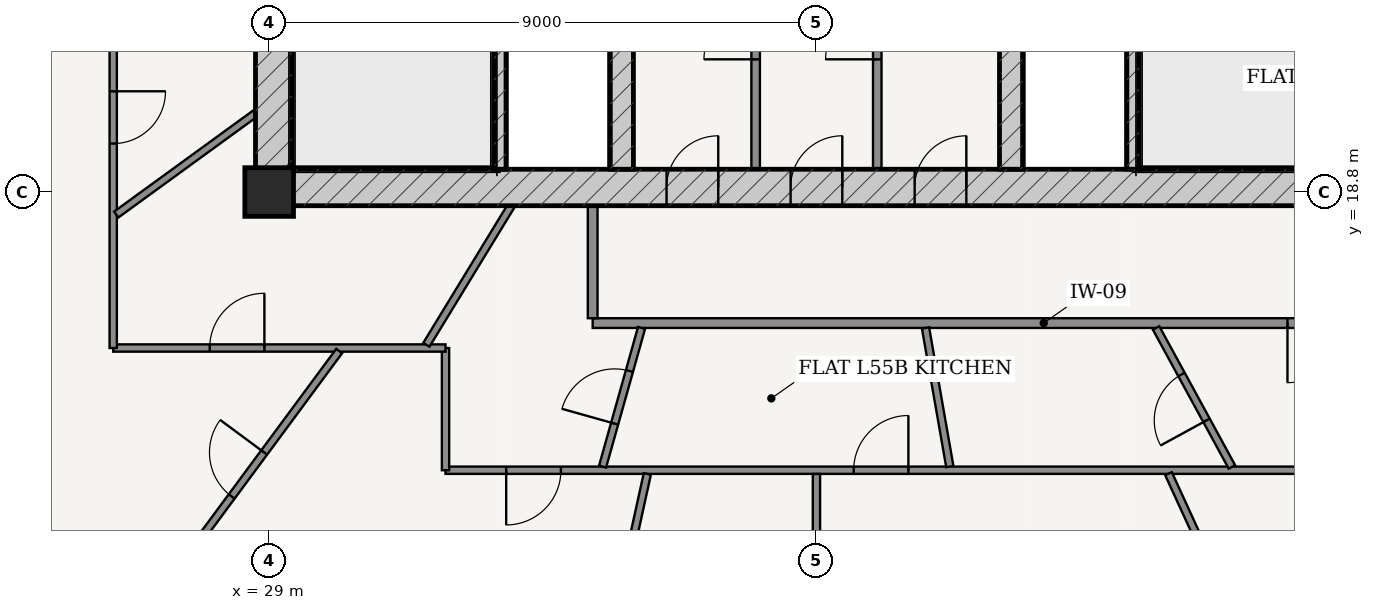
"""IFC4 building model, lengths in metres.
Left out: names, types, materials, properties, quantities, classifications, styles, units other than length and angle.
Written with IfcOpenShell. Run it as: python <this file> out.ifc"""

import sys

from ifc_helpers import new_model, si_unit, direction, frame, frame_2d, origin, origin_2d, place, context, subcontext, project, spatial, rectangle, extrude, source, transform, mapped, element, fill, save


model = new_model("IFC4")
c1 = context("Model", 3, precision=1e-05, world=origin(), true_north=direction((-0.2419218956, 0.970295726276)))
c2 = subcontext(c1, "Body", "Model", "MODEL_VIEW")
j1 = project(units=[si_unit("LENGTHUNIT", "METRE"), si_unit("PLANEANGLEUNIT", "RADIAN")], contexts=[c1])
p1 = place(None, origin())
s1 = spatial("IfcSite", under=j1, at=p1, CompositionType="ELEMENT")
p2 = place(p1, origin())
s2 = spatial("IfcBuilding", under=s1, at=p2, CompositionType="ELEMENT")
p3 = place(p2, frame((0.0, 0.0, 209.7)))
s3 = spatial("IfcBuildingStorey", under=s2, at=p3, CompositionType="ELEMENT", Elevation=209.7)
p4 = place(p3, frame((29.0, 18.8, 0.0), z_axis=(0.0, 0.0, 1.0), x_axis=(1.0, 0.0, 0.0)))
e1 = element("IfcColumn", 1, at=p4, inside=s3, PredefinedType="COLUMN", context=c2, shape_type="SweptSolid", body=[
    extrude(rectangle(XDim=0.8, YDim=0.8, at=origin_2d()), origin(), (0.0, 0.0, 1.0), 3.7),
])
p5 = place(p3, frame((28.775, 18.875, 0.0), z_axis=(0.0, 0.0, 1.0), x_axis=(1.0, 0.0, 0.0)))
e2 = element("IfcWall", 2, at=p5, inside=s3, PredefinedType="SHEAR", context=c2, shape_type="SweptSolid", body=[
    extrude(rectangle(XDim=18.45, YDim=0.6, at=frame_2d((9.225, 0.0))), origin(), (0.0, 0.0, 1.0), 3.435),
])
p6 = place(p5, frame((6.76, 0.0, 0.0)))
e3 = element("IfcOpeningElement", 3, at=p6, cuts=e2, PredefinedType="OPENING", context=c2, shape_type="SweptSolid", body=[
    extrude(rectangle(XDim=0.85, YDim=2.1, at=frame_2d((0.425, 1.05))), frame((0.0, 0.31, 0.0), z_axis=(0.0, -1.0, 0.0), x_axis=(1.0, 0.0, 0.0)), (0.0, 0.0, 1.0), 0.62),
])
p7 = place(p5, frame((8.8, 0.0, 0.0)))
e4 = element("IfcOpeningElement", 4, at=p7, cuts=e2, PredefinedType="OPENING", context=c2, shape_type="SweptSolid", body=[
    extrude(rectangle(XDim=0.85, YDim=2.1, at=frame_2d((0.425, 1.05))), frame((0.0, 0.31, 0.0), z_axis=(0.0, -1.0, 0.0), x_axis=(1.0, 0.0, 0.0)), (0.0, 0.0, 1.0), 0.62),
])
p8 = place(p5, frame((10.84, 0.0, 0.0)))
e5 = element("IfcOpeningElement", 5, at=p8, cuts=e2, PredefinedType="OPENING", context=c2, shape_type="SweptSolid", body=[
    extrude(rectangle(XDim=0.85, YDim=2.1, at=frame_2d((0.425, 1.05))), frame((0.0, 0.31, 0.0), z_axis=(0.0, -1.0, 0.0), x_axis=(1.0, 0.0, 0.0)), (0.0, 0.0, 1.0), 0.62),
])
p9 = place(p3, frame((29.075, 19.175, 0.0), z_axis=(0.0, 0.0, 1.0), x_axis=(0.0, 1.0, 0.0)))
e6 = element("IfcWall", 6, at=p9, inside=s3, PredefinedType="SHEAR", context=c2, shape_type="SweptSolid", body=[
    extrude(rectangle(XDim=15.25, YDim=0.6, at=frame_2d((7.625, 0.0))), origin(), (0.0, 0.0, 1.0), 3.435),
])
p10 = place(p9, frame((9.875, 0.0, 0.0)))
e7 = element("IfcOpeningElement", 7, at=p10, cuts=e6, PredefinedType="OPENING", context=c2, shape_type="SweptSolid", body=[
    extrude(rectangle(XDim=1.5, YDim=2.2, at=frame_2d((0.75, 1.1))), frame((0.0, 0.31, 0.0), z_axis=(0.0, -1.0, 0.0), x_axis=(1.0, 0.0, 0.0)), (0.0, 0.0, 1.0), 0.62),
])
for number, where, z_axis, x_axis in (
    (8, (32.795, 19.175, 0.0), (0.0, 0.0, 1.0), (0.0, 1.0, 0.0)),
    (9, (43.205, 19.175, 0.0), (0.0, 0.0, 1.0), (0.0, 1.0, 0.0)),
):
    element("IfcWall", number, at=place(p3, frame(where, z_axis=z_axis, x_axis=x_axis)), inside=s3, PredefinedType="SOLIDWALL", context=c2, shape_type="SweptSolid", body=[
        extrude(rectangle(XDim=7.375, YDim=0.2, at=frame_2d((3.688, 0.0))), origin(), (0.0, 0.0, 1.0), 3.435),
    ])
p11 = place(p3, frame((34.8, 19.175, 0.0), z_axis=(0.0, 0.0, 1.0), x_axis=(0.0, 1.0, 0.0)))
e10 = element("IfcWall", 10, at=p11, inside=s3, PredefinedType="SHEAR", context=c2, shape_type="SweptSolid", body=[
    extrude(rectangle(XDim=15.25, YDim=0.38, at=frame_2d((7.625, 0.0))), origin(), (0.0, 0.0, 1.0), 3.435),
])
p12 = place(p11, frame((7.8, 0.0, 0.0)))
e11 = element("IfcOpeningElement", 11, at=p12, cuts=e10, PredefinedType="OPENING", context=c2, shape_type="SweptSolid", body=[
    extrude(rectangle(XDim=1.05, YDim=2.15, at=frame_2d((0.525, 1.075))), frame((0.0, 0.2, 0.0), z_axis=(0.0, -1.0, 0.0), x_axis=(1.0, 0.0, 0.0)), (0.0, 0.0, 1.0), 0.4),
])
p13 = place(p3, frame((41.2, 19.175, 0.0), z_axis=(0.0, 0.0, 1.0), x_axis=(0.0, 1.0, 0.0)))
e12 = element("IfcWall", 12, at=p13, inside=s3, PredefinedType="SHEAR", context=c2, shape_type="SweptSolid", body=[
    extrude(rectangle(XDim=15.25, YDim=0.38, at=frame_2d((7.625, 0.0))), origin(), (0.0, 0.0, 1.0), 3.435),
])
p14 = place(p13, frame((7.8, 0.0, 0.0)))
e13 = element("IfcOpeningElement", 13, at=p14, cuts=e12, PredefinedType="OPENING", context=c2, shape_type="SweptSolid", body=[
    extrude(rectangle(XDim=1.05, YDim=2.15, at=frame_2d((0.525, 1.075))), frame((0.0, 0.2, 0.0), z_axis=(0.0, -1.0, 0.0), x_axis=(1.0, 0.0, 0.0)), (0.0, 0.0, 1.0), 0.4),
])
p15 = place(p3, frame((37.0, 19.175, 0.0), z_axis=(0.0, 0.0, 1.0), x_axis=(0.0, 1.0, 0.0)))
e14 = element("IfcWall", 14, at=p15, inside=s3, PredefinedType="PARTITIONING", context=c2, shape_type="SweptSolid", body=[
    extrude(rectangle(XDim=4.465, YDim=0.14, at=frame_2d((2.232, 0.0))), origin(), (0.0, 0.0, 1.0), 3.435),
])
p16 = place(p15, frame((1.808, 0.0, 0.0)))
e15 = element("IfcOpeningElement", 15, at=p16, cuts=e14, PredefinedType="OPENING", context=c2, shape_type="SweptSolid", body=[
    extrude(rectangle(XDim=0.85, YDim=2.1, at=frame_2d((0.425, 1.05))), frame((0.0, 0.08, 0.0), z_axis=(0.0, -1.0, 0.0), x_axis=(1.0, 0.0, 0.0)), (0.0, 0.0, 1.0), 0.16),
])
p17 = place(p3, frame((39.0, 19.175, 0.0), z_axis=(0.0, 0.0, 1.0), x_axis=(0.0, 1.0, 0.0)))
e16 = element("IfcWall", 16, at=p17, inside=s3, PredefinedType="PARTITIONING", context=c2, shape_type="SweptSolid", body=[
    extrude(rectangle(XDim=4.465, YDim=0.14, at=frame_2d((2.232, 0.0))), origin(), (0.0, 0.0, 1.0), 3.435),
])
p18 = place(p17, frame((1.808, 0.0, 0.0)))
e17 = element("IfcOpeningElement", 17, at=p18, cuts=e16, PredefinedType="OPENING", context=c2, shape_type="SweptSolid", body=[
    extrude(rectangle(XDim=0.85, YDim=2.1, at=frame_2d((0.425, 1.05))), frame((0.0, 0.08, 0.0), z_axis=(0.0, -1.0, 0.0), x_axis=(1.0, 0.0, 0.0)), (0.0, 0.0, 1.0), 0.16),
])
p19 = place(p3, frame((34.32, 16.645, 0.0), z_axis=(0.0, 0.0, 1.0), x_axis=(1.0, 0.0, 0.0)))
e18 = element("IfcWall", 18, at=p19, inside=s3, PredefinedType="PARTITIONING", context=c2, shape_type="SweptSolid", body=[
    extrude(rectangle(XDim=14.835, YDim=0.16, at=frame_2d((7.417, 0.0))), origin(), (0.0, 0.0, 1.0), 2.951),
])
p20 = place(p19, frame((11.426, 0.0, 0.0)))
e19 = element("IfcOpeningElement", 19, at=p20, cuts=e18, PredefinedType="OPENING", context=c2, shape_type="SweptSolid", body=[
    extrude(rectangle(XDim=0.98, YDim=2.2, at=frame_2d((0.49, 1.1))), frame((0.0, 0.09, 0.0), z_axis=(0.0, -1.0, 0.0), x_axis=(1.0, 0.0, 0.0)), (0.0, 0.0, 1.0), 0.18),
])
p21 = place(p3, frame((34.32, 16.725, 0.0), z_axis=(0.0, 0.0, 1.0), x_axis=(0.0, 1.0, 0.0)))
e20 = element("IfcWall", 20, at=p21, inside=s3, PredefinedType="PARTITIONING", context=c2, shape_type="SweptSolid", body=[
    extrude(rectangle(XDim=1.85, YDim=0.16, at=frame_2d((0.925, 0.0))), origin(), (0.0, 0.0, 1.0), 3.435),
])
p22 = place(p3, frame((28.775, 23.347, 0.0), z_axis=(0.0, 0.0, 1.0), x_axis=(-0.936537569358, -0.350567227761, 0.0)))
e21 = element("IfcWall", 21, at=p22, inside=s3, PredefinedType="PARTITIONING", context=c2, shape_type="SweptSolid", body=[
    extrude(rectangle(XDim=11.594, YDim=0.2, at=frame_2d((5.797, 0.0))), origin(), (0.0, 0.0, 1.0), 2.951),
])
p23 = place(p3, frame((51.575, 14.225, 0.0), z_axis=(0.0, 0.0, 1.0), x_axis=(-1.0, 0.0, 0.0)))
e22 = element("IfcWall", 22, at=p23, inside=s3, PredefinedType="PARTITIONING", context=c2, shape_type="SweptSolid", body=[
    extrude(rectangle(XDim=19.675, YDim=0.12, at=frame_2d((9.837, 0.0))), origin(), (0.0, 0.0, 1.0), 2.951),
])
p24 = place(p23, frame((3.083, 0.0, 0.0)))
e23 = element("IfcOpeningElement", 23, at=p24, cuts=e22, PredefinedType="OPENING", context=c2, shape_type="SweptSolid", body=[
    extrude(rectangle(XDim=0.9, YDim=2.15, at=frame_2d((0.45, 1.075))), frame((0.0, 0.07, 0.0), z_axis=(0.0, -1.0, 0.0), x_axis=(1.0, 0.0, 0.0)), (0.0, 0.0, 1.0), 0.14),
])
p25 = place(p23, frame((12.063, 0.0, 0.0)))
e24 = element("IfcOpeningElement", 24, at=p25, cuts=e22, PredefinedType="OPENING", context=c2, shape_type="SweptSolid", body=[
    extrude(rectangle(XDim=0.9, YDim=2.15, at=frame_2d((0.45, 1.075))), frame((0.0, 0.07, 0.0), z_axis=(0.0, -1.0, 0.0), x_axis=(1.0, 0.0, 0.0)), (0.0, 0.0, 1.0), 0.14),
])
p26 = place(p23, frame((17.777, 0.0, 0.0)))
e25 = element("IfcOpeningElement", 25, at=p26, cuts=e22, PredefinedType="OPENING", context=c2, shape_type="SweptSolid", body=[
    extrude(rectangle(XDim=0.9, YDim=2.15, at=frame_2d((0.45, 1.075))), frame((0.0, 0.07, 0.0), z_axis=(0.0, -1.0, 0.0), x_axis=(1.0, 0.0, 0.0)), (0.0, 0.0, 1.0), 0.14),
])
p27 = place(p3, frame((31.9, 14.225, 0.0), z_axis=(0.0, 0.0, 1.0), x_axis=(0.0, 1.0, 0.0)))
e26 = element("IfcWall", 26, at=p27, inside=s3, PredefinedType="PARTITIONING", context=c2, shape_type="SweptSolid", body=[
    extrude(rectangle(XDim=2.01, YDim=0.12, at=frame_2d((1.005, 0.0))), origin(), (0.0, 0.0, 1.0), 3.11),
])
p28 = place(p3, frame((31.9, 16.235, 0.0), z_axis=(0.0, 0.0, 1.0), x_axis=(-1.0, 0.0, 0.0)))
e27 = element("IfcWall", 27, at=p28, inside=s3, PredefinedType="PARTITIONING", context=c2, shape_type="SweptSolid", body=[
    extrude(rectangle(XDim=5.465, YDim=0.12, at=frame_2d((2.732, 0.0))), origin(), (0.0, 0.0, 1.0), 2.951),
])
p29 = place(p28, frame((2.979, 0.0, 0.0)))
e28 = element("IfcOpeningElement", 28, at=p29, cuts=e27, PredefinedType="OPENING", context=c2, shape_type="SweptSolid", body=[
    extrude(rectangle(XDim=0.9, YDim=2.15, at=frame_2d((0.45, 1.075))), frame((0.0, 0.07, 0.0), z_axis=(0.0, -1.0, 0.0), x_axis=(1.0, 0.0, 0.0)), (0.0, 0.0, 1.0), 0.14),
])
p30 = place(p3, frame((26.435, 16.235, 0.0), z_axis=(0.0, 0.0, 1.0), x_axis=(0.0, 1.0, 0.0)))
e29 = element("IfcWall", 29, at=p30, inside=s3, PredefinedType="PARTITIONING", context=c2, shape_type="SweptSolid", body=[
    extrude(rectangle(XDim=5.665, YDim=0.12, at=frame_2d((2.833, 0.0))), origin(), (0.0, 0.0, 1.0), 2.951),
])
p31 = place(p30, frame((3.362, 0.0, 0.0)))
e30 = element("IfcOpeningElement", 30, at=p31, cuts=e29, PredefinedType="OPENING", context=c2, shape_type="SweptSolid", body=[
    extrude(rectangle(XDim=0.86, YDim=2.15, at=frame_2d((0.43, 1.075))), frame((0.0, 0.07, 0.0), z_axis=(0.0, -1.0, 0.0), x_axis=(1.0, 0.0, 0.0)), (0.0, 0.0, 1.0), 0.14),
])
p32 = place(p3, frame((30.151, 16.185, 0.0), z_axis=(0.0, 0.0, 1.0), x_axis=(-0.594540664599, -0.804065543434, 0.0)))
e31 = element("IfcWall", 31, at=p32, inside=s3, PredefinedType="PARTITIONING", context=c2, shape_type="SweptSolid", body=[
    extrude(rectangle(XDim=7.066, YDim=0.12, at=frame_2d((3.533, 0.0))), origin(), (0.0, 0.0, 1.0), 2.951),
])
p33 = place(p32, frame((2.075, 0.0, 0.0)))
e32 = element("IfcOpeningElement", 32, at=p33, cuts=e31, PredefinedType="OPENING", context=c2, shape_type="SweptSolid", body=[
    extrude(rectangle(XDim=0.9, YDim=2.15, at=frame_2d((0.45, 1.075))), frame((0.0, 0.07, 0.0), z_axis=(0.0, -1.0, 0.0), x_axis=(1.0, 0.0, 0.0)), (0.0, 0.0, 1.0), 0.14),
])
p34 = place(p3, frame((35.219, 14.165, 0.0), z_axis=(0.0, 0.0, 1.0), x_axis=(-0.214959845337, -0.976622887758, 0.0)))
e33 = element("IfcWall", 33, at=p34, inside=s3, PredefinedType="PARTITIONING", context=c2, shape_type="SweptSolid", body=[
    extrude(rectangle(XDim=6.744, YDim=0.12, at=frame_2d((3.372, 0.0))), origin(), (0.0, 0.0, 1.0), 2.951),
])
p35 = place(p3, frame((38.0, 14.163, 0.0), z_axis=(0.0, 0.0, 1.0), x_axis=(0.0, -1.0, 0.0)))
e34 = element("IfcWall", 34, at=p35, inside=s3, PredefinedType="PARTITIONING", context=c2, shape_type="SweptSolid", body=[
    extrude(rectangle(XDim=7.003, YDim=0.12, at=frame_2d((3.501, 0.0))), origin(), (0.0, 0.0, 1.0), 2.951),
])
p36 = place(p35, frame((3.052, 0.0, 0.0)))
e35 = element("IfcOpeningElement", 35, at=p36, cuts=e34, PredefinedType="OPENING", context=c2, shape_type="SweptSolid", body=[
    extrude(rectangle(XDim=0.9, YDim=2.15, at=frame_2d((0.45, 1.075))), frame((0.0, 0.07, 0.0), z_axis=(0.0, -1.0, 0.0), x_axis=(1.0, 0.0, 0.0)), (0.0, 0.0, 1.0), 0.14),
])
p37 = place(p3, frame((43.79, 14.169, 0.0), z_axis=(0.0, 0.0, 1.0), x_axis=(0.416687974363, -0.909049576218, 0.0)))
e36 = element("IfcWall", 36, at=p37, inside=s3, PredefinedType="PARTITIONING", context=c2, shape_type="SweptSolid", body=[
    extrude(rectangle(XDim=6.065, YDim=0.12, at=frame_2d((3.033, 0.0))), origin(), (0.0, 0.0, 1.0), 2.951),
])
p38 = place(p37, frame((2.583, 0.0, 0.0)))
e37 = element("IfcOpeningElement", 37, at=p38, cuts=e36, PredefinedType="OPENING", context=c2, shape_type="SweptSolid", body=[
    extrude(rectangle(XDim=0.9, YDim=2.15, at=frame_2d((0.45, 1.075))), frame((0.0, 0.07, 0.0), z_axis=(0.0, -1.0, 0.0), x_axis=(1.0, 0.0, 0.0)), (0.0, 0.0, 1.0), 0.14),
])
p39 = place(p3, frame((28.775, 20.094, 0.0), z_axis=(0.0, 0.0, 1.0), x_axis=(-0.808862864425, -0.587997335499, 0.0)))
e38 = element("IfcWall", 38, at=p39, inside=s3, PredefinedType="PARTITIONING", context=c2, shape_type="SweptSolid", body=[
    extrude(rectangle(XDim=2.831, YDim=0.12, at=frame_2d((1.416, 0.0))), origin(), (0.0, 0.0, 1.0), 3.435),
])
p40 = place(p3, frame((32.981, 18.575, 0.0), z_axis=(0.0, 0.0, 1.0), x_axis=(-0.520926540997, -0.853601510592, 0.0)))
e39 = element("IfcWall", 39, at=p40, inside=s3, PredefinedType="PARTITIONING", context=c2, shape_type="SweptSolid", body=[
    extrude(rectangle(XDim=2.679, YDim=0.12, at=frame_2d((1.34, 0.0))), origin(), (0.0, 0.0, 1.0), 3.435),
])
p41 = place(p3, frame((35.124, 16.565, 0.0), z_axis=(0.0, 0.0, 1.0), x_axis=(-0.270566477163, -0.962701293982, 0.0)))
e40 = element("IfcWall", 40, at=p41, inside=s3, PredefinedType="PARTITIONING", context=c2, shape_type="SweptSolid", body=[
    extrude(rectangle(XDim=2.369, YDim=0.12, at=frame_2d((1.184, 0.0))), origin(), (0.0, 0.0, 1.0), 3.435),
])
p42 = place(p41, frame((0.734, 0.0, 0.0)))
e41 = element("IfcOpeningElement", 41, at=p42, cuts=e40, PredefinedType="OPENING", context=c2, shape_type="SweptSolid", body=[
    extrude(rectangle(XDim=0.9, YDim=2.15, at=frame_2d((0.45, 1.075))), frame((0.0, 0.07, 0.0), z_axis=(0.0, -1.0, 0.0), x_axis=(1.0, 0.0, 0.0)), (0.0, 0.0, 1.0), 0.14),
])
p43 = place(p3, frame((39.794, 16.565, 0.0), z_axis=(0.0, 0.0, 1.0), x_axis=(0.172641422295, -0.984984740647, 0.0)))
e42 = element("IfcWall", 42, at=p43, inside=s3, PredefinedType="PARTITIONING", context=c2, shape_type="SweptSolid", body=[
    extrude(rectangle(XDim=2.313, YDim=0.12, at=frame_2d((1.157, 0.0))), origin(), (0.0, 0.0, 1.0), 3.435),
])
p44 = place(p3, frame((43.585, 16.565, 0.0), z_axis=(0.0, 0.0, 1.0), x_axis=(0.479068920965, -0.877777288932, 0.0)))
e43 = element("IfcWall", 43, at=p44, inside=s3, PredefinedType="PARTITIONING", context=c2, shape_type="SweptSolid", body=[
    extrude(rectangle(XDim=2.604, YDim=0.12, at=frame_2d((1.302, 0.0))), origin(), (0.0, 0.0, 1.0), 3.11),
])
p45 = place(p44, frame((0.872, 0.0, 0.0)))
e44 = element("IfcOpeningElement", 44, at=p45, cuts=e43, PredefinedType="OPENING", context=c2, shape_type="SweptSolid", body=[
    extrude(rectangle(XDim=0.86, YDim=2.15, at=frame_2d((0.43, 1.075))), frame((0.0, 0.07, 0.0), z_axis=(0.0, -1.0, 0.0), x_axis=(1.0, 0.0, 0.0)), (0.0, 0.0, 1.0), 0.14),
])
m1 = source(origin(), c2, "Body", "SweptSolid", [
    extrude(rectangle(XDim=0.85, YDim=2.1, at=frame_2d((0.425, 1.05))), frame((0.0, 0.025, 0.0), z_axis=(0.0, -1.0, 0.0), x_axis=(1.0, 0.0, 0.0)), (0.0, 0.0, 1.0), 0.05),
])
p46 = place(p6, origin())
e45 = element("IfcDoor", 45, at=p46, inside=s3, OperationType="SINGLE_SWING_RIGHT", PredefinedType="DOOR", context=c2, shape_type="MappedRepresentation", body=[
    mapped(m1, transform((0.0, 0.0, 0.0), scale=1.0)),
])
fill(e3, e45)
p47 = place(p7, origin())
e46 = element("IfcDoor", 46, at=p47, inside=s3, OperationType="SINGLE_SWING_RIGHT", PredefinedType="DOOR", context=c2, shape_type="MappedRepresentation", body=[
    mapped(m1, transform((0.0, 0.0, 0.0), scale=1.0)),
])
fill(e4, e46)
p48 = place(p8, origin())
e47 = element("IfcDoor", 47, at=p48, inside=s3, OperationType="SINGLE_SWING_RIGHT", PredefinedType="DOOR", context=c2, shape_type="MappedRepresentation", body=[
    mapped(m1, transform((0.0, 0.0, 0.0), scale=1.0)),
])
fill(e5, e47)
p49 = place(p16, origin())
e48 = element("IfcDoor", 48, at=p49, inside=s3, OperationType="SINGLE_SWING_LEFT", PredefinedType="DOOR", context=c2, shape_type="MappedRepresentation", body=[
    mapped(m1, transform((0.0, 0.0, 0.0), scale=1.0)),
])
fill(e15, e48)
p50 = place(p18, origin())
e49 = element("IfcDoor", 49, at=p50, inside=s3, OperationType="SINGLE_SWING_LEFT", PredefinedType="DOOR", context=c2, shape_type="MappedRepresentation", body=[
    mapped(m1, transform((0.0, 0.0, 0.0), scale=1.0)),
])
fill(e17, e49)
m2 = source(origin(), c2, "Body", "SweptSolid", [
    extrude(rectangle(XDim=0.98, YDim=2.2, at=frame_2d((0.49, 1.1))), frame((0.0, 0.025, 0.0), z_axis=(0.0, -1.0, 0.0), x_axis=(1.0, 0.0, 0.0)), (0.0, 0.0, 1.0), 0.05),
])
p51 = place(p20, frame((0.98, 0.0, 0.0), z_axis=(0.0, 0.0, 1.0), x_axis=(-1.0, 0.0, 0.0)))
e50 = element("IfcDoor", 50, at=p51, inside=s3, OperationType="SINGLE_SWING_RIGHT", PredefinedType="DOOR", context=c2, shape_type="MappedRepresentation", body=[
    mapped(m2, transform((0.0, 0.0, 0.0), scale=1.0)),
])
fill(e19, e50)
m3 = source(origin(), c2, "Body", "SweptSolid", [
    extrude(rectangle(XDim=0.86, YDim=2.15, at=frame_2d((0.43, 1.075))), frame((0.0, 0.025, 0.0), z_axis=(0.0, -1.0, 0.0), x_axis=(1.0, 0.0, 0.0)), (0.0, 0.0, 1.0), 0.05),
])
p52 = place(p45, frame((0.86, 0.0, 0.0), z_axis=(0.0, 0.0, 1.0), x_axis=(-1.0, 0.0, 0.0)))
e51 = element("IfcDoor", 51, at=p52, inside=s3, OperationType="SINGLE_SWING_LEFT", PredefinedType="DOOR", context=c2, shape_type="MappedRepresentation", body=[
    mapped(m3, transform((0.0, 0.0, 0.0), scale=1.0)),
])
fill(e44, e51)
m4 = source(origin(), c2, "Body", "SweptSolid", [
    extrude(rectangle(XDim=0.9, YDim=2.15, at=frame_2d((0.45, 1.075))), frame((0.0, 0.025, 0.0), z_axis=(0.0, -1.0, 0.0), x_axis=(1.0, 0.0, 0.0)), (0.0, 0.0, 1.0), 0.05),
])
p53 = place(p25, frame((0.9, 0.0, 0.0), z_axis=(0.0, 0.0, 1.0), x_axis=(-1.0, 0.0, 0.0)))
e52 = element("IfcDoor", 52, at=p53, inside=s3, OperationType="SINGLE_SWING_RIGHT", PredefinedType="DOOR", context=c2, shape_type="MappedRepresentation", body=[
    mapped(m4, transform((0.0, 0.0, 0.0), scale=1.0)),
])
fill(e24, e52)
p54 = place(p42, frame((0.9, 0.0, 0.0), z_axis=(0.0, 0.0, 1.0), x_axis=(-1.0, 0.0, 0.0)))
e53 = element("IfcDoor", 53, at=p54, inside=s3, OperationType="SINGLE_SWING_LEFT", PredefinedType="DOOR", context=c2, shape_type="MappedRepresentation", body=[
    mapped(m4, transform((0.0, 0.0, 0.0), scale=1.0)),
])
fill(e41, e53)
p55 = place(p26, origin())
e54 = element("IfcDoor", 54, at=p55, inside=s3, OperationType="SINGLE_SWING_RIGHT", PredefinedType="DOOR", context=c2, shape_type="MappedRepresentation", body=[
    mapped(m4, transform((0.0, 0.0, 0.0), scale=1.0)),
])
fill(e25, e54)
p56 = place(p33, frame((0.9, 0.0, 0.0), z_axis=(0.0, 0.0, 1.0), x_axis=(-1.0, 0.0, 0.0)))
e55 = element("IfcDoor", 55, at=p56, inside=s3, OperationType="SINGLE_SWING_RIGHT", PredefinedType="DOOR", context=c2, shape_type="MappedRepresentation", body=[
    mapped(m4, transform((0.0, 0.0, 0.0), scale=1.0)),
])
fill(e32, e55)
p57 = place(p31, frame((0.86, 0.0, 0.0), z_axis=(0.0, 0.0, 1.0), x_axis=(-1.0, 0.0, 0.0)))
e56 = element("IfcDoor", 56, at=p57, inside=s3, OperationType="SINGLE_SWING_LEFT", PredefinedType="DOOR", context=c2, shape_type="MappedRepresentation", body=[
    mapped(m3, transform((0.0, 0.0, 0.0), scale=1.0)),
])
fill(e30, e56)
p58 = place(p29, frame((0.9, 0.0, 0.0), z_axis=(0.0, 0.0, 1.0), x_axis=(-1.0, 0.0, 0.0)))
e57 = element("IfcDoor", 57, at=p58, inside=s3, OperationType="SINGLE_SWING_RIGHT", PredefinedType="DOOR", context=c2, shape_type="MappedRepresentation", body=[
    mapped(m4, transform((0.0, 0.0, 0.0), scale=1.0)),
])
fill(e28, e57)
save(model, sys.argv[1])
